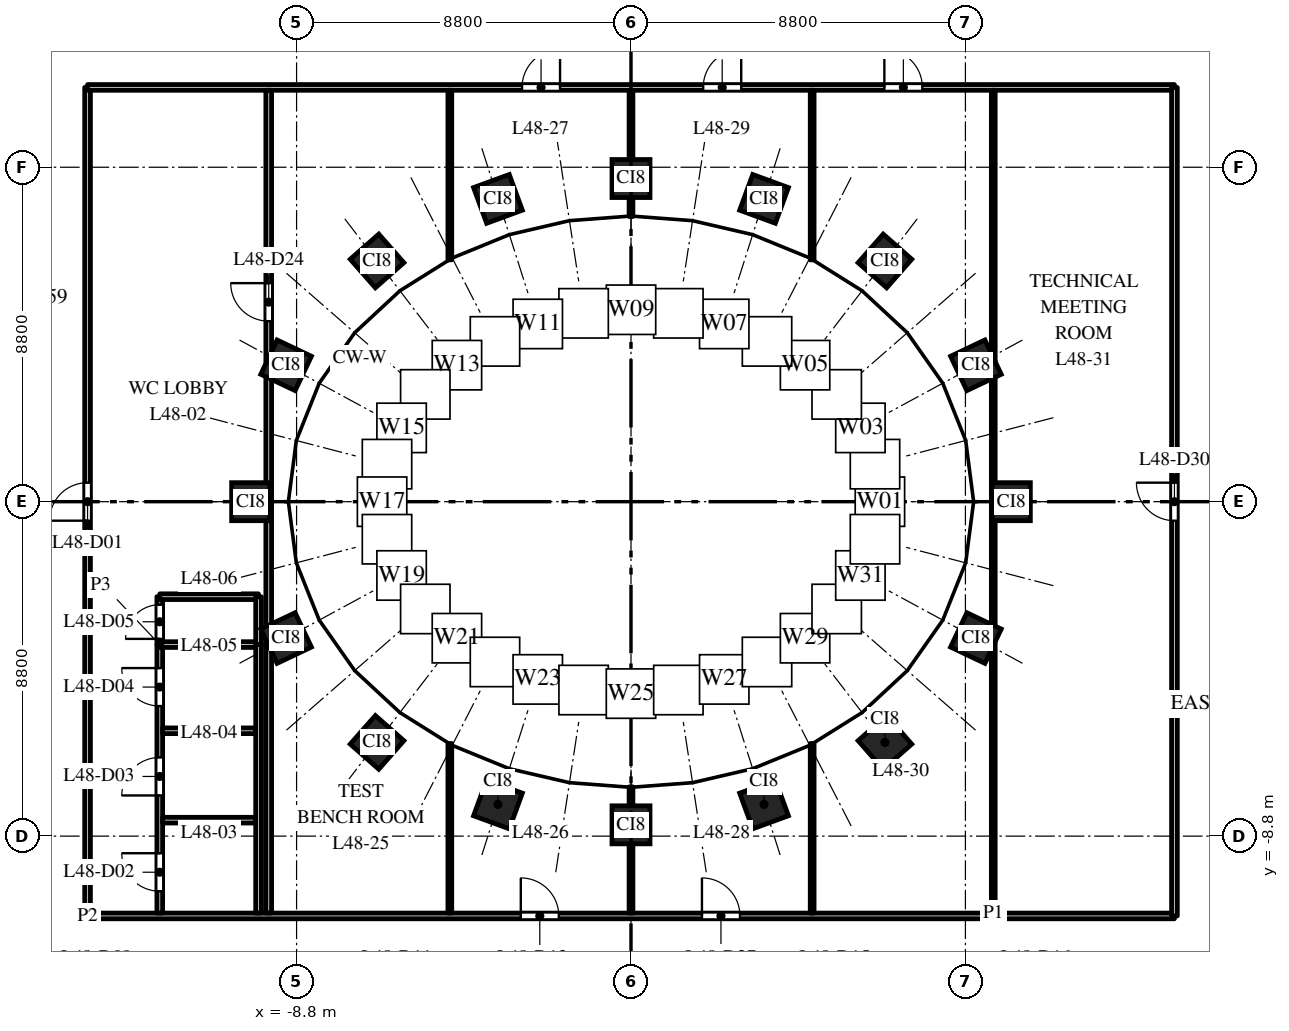
"""IFC4 building model, lengths in metres.
Left out: names, types, materials, properties, quantities, classifications, styles, units other than length and angle.
Written with IfcOpenShell. Run it as: python <this file> out.ifc"""

import sys

from ifc_helpers import new_model, si_unit, direction, frame, frame_2d, origin, origin_2d, place, context, subcontext, project, spatial, rectangle, extrude, element, fill, save


model = new_model("IFC4")
c1 = context("Model", 3, precision=1e-05, world=origin(), true_north=direction((0.0, 1.0)))
c2 = subcontext(c1, "Body", "Model", "MODEL_VIEW")
j1 = project(units=[si_unit("LENGTHUNIT", "METRE"), si_unit("PLANEANGLEUNIT", "RADIAN")], contexts=[c1])
p1 = place(None, origin())
s1 = spatial("IfcSite", under=j1, at=p1, CompositionType="ELEMENT")
p2 = place(p1, origin())
s2 = spatial("IfcBuilding", under=s1, at=p2, CompositionType="ELEMENT")
p3 = place(p2, frame((0.0, 0.0, 233.5)))
s3 = spatial("IfcBuildingStorey", under=s2, at=p3, CompositionType="ELEMENT", Elevation=233.5)
for number, where, z_axis, x_axis in (
    (1, (10.008, 0.0, 0.0), (0.0, 0.0, 1.0), (0.0, 1.0, 0.0)),
    (2, (9.076, 3.588, 0.0), (0.0, 0.0, 1.0), (-0.429, 0.903, 0.0)),
    (3, (6.682, 6.334, 0.0), (0.0, 0.0, 1.0), (-0.751, 0.66, 0.0)),
    (4, (3.501, 7.967, 0.0), (0.0, 0.0, 1.0), (-0.939, 0.344, 0.0)),
    (5, (0.0, 8.503, 0.0), (0.0, 0.0, 1.0), (-1.0, 0.0, 0.0)),
    (6, (-3.501, 7.967, 0.0), (0.0, 0.0, 1.0), (-0.939, -0.344, 0.0)),
    (7, (-6.682, 6.334, 0.0), (0.0, 0.0, 1.0), (-0.751, -0.66, 0.0)),
    (8, (-9.076, 3.588, 0.0), (0.0, 0.0, 1.0), (-0.429, -0.903, 0.0)),
    (9, (-10.008, 0.0, 0.0), (0.0, 0.0, 1.0), (0.0, -1.0, 0.0)),
    (10, (-9.076, -3.588, 0.0), (0.0, 0.0, 1.0), (0.429, -0.903, 0.0)),
    (11, (-6.682, -6.334, 0.0), (0.0, 0.0, 1.0), (0.751, -0.66, 0.0)),
    (12, (-3.501, -7.967, 0.0), (0.0, 0.0, 1.0), (0.939, -0.344, 0.0)),
    (13, (0.0, -8.503, 0.0), (0.0, 0.0, 1.0), (1.0, 0.0, 0.0)),
    (14, (3.501, -7.967, 0.0), (0.0, 0.0, 1.0), (0.939, 0.344, 0.0)),
    (15, (6.682, -6.334, 0.0), (0.0, 0.0, 1.0), (0.751, 0.66, 0.0)),
    (16, (9.076, -3.588, 0.0), (0.0, 0.0, 1.0), (0.429, 0.903, 0.0)),
):
    element("IfcColumn", number, at=place(p3, frame(where, z_axis=z_axis, x_axis=x_axis)), inside=s3, PredefinedType="COLUMN", context=c2, shape_type="SweptSolid", body=[
        extrude(rectangle(XDim=1.0, YDim=1.0, at=origin_2d()), origin(), (0.0, 0.0, 1.0), 4.0),
    ])
p4 = place(p3, frame((-14.3, -10.9, 0.0), z_axis=(0.0, 0.0, 1.0), x_axis=(0.0, 1.0, 0.0)))
e17 = element("IfcWall", 17, at=p4, inside=s3, PredefinedType="PARTITIONING", context=c2, shape_type="SweptSolid", body=[
    extrude(rectangle(XDim=21.8, YDim=0.15, at=frame_2d((10.9, 0.0))), origin(), (0.0, 0.0, 1.0), 2.75),
])
p5 = place(p4, frame((10.4, 0.0, 0.0)))
e18 = element("IfcOpeningElement", 18, at=p5, cuts=e17, PredefinedType="OPENING", context=c2, shape_type="SweptSolid", body=[
    extrude(rectangle(XDim=1.0, YDim=2.1, at=frame_2d((0.5, 1.05))), frame((0.0, 0.085, 0.0), z_axis=(0.0, -1.0, 0.0), x_axis=(1.0, 0.0, 0.0)), (0.0, 0.0, 1.0), 0.17),
])
p6 = place(p3, frame((-14.3, -10.9, 0.0), z_axis=(0.0, 0.0, 1.0), x_axis=(1.0, 0.0, 0.0)))
e19 = element("IfcWall", 19, at=p6, inside=s3, PredefinedType="PARTITIONING", context=c2, shape_type="SweptSolid", body=[
    extrude(rectangle(XDim=28.6, YDim=0.15, at=frame_2d((14.3, 0.0))), origin(), (0.0, 0.0, 1.0), 2.85),
])
p7 = place(p6, frame((11.4, 0.0, 0.0)))
e20 = element("IfcOpeningElement", 20, at=p7, cuts=e19, PredefinedType="OPENING", context=c2, shape_type="SweptSolid", body=[
    extrude(rectangle(XDim=1.0, YDim=2.1, at=frame_2d((0.5, 1.05))), frame((0.0, 0.085, 0.0), z_axis=(0.0, -1.0, 0.0), x_axis=(1.0, 0.0, 0.0)), (0.0, 0.0, 1.0), 0.17),
])
p8 = place(p6, frame((16.167, 0.0, 0.0)))
e21 = element("IfcOpeningElement", 21, at=p8, cuts=e19, PredefinedType="OPENING", context=c2, shape_type="SweptSolid", body=[
    extrude(rectangle(XDim=1.0, YDim=2.1, at=frame_2d((0.5, 1.05))), frame((0.0, 0.085, 0.0), z_axis=(0.0, -1.0, 0.0), x_axis=(1.0, 0.0, 0.0)), (0.0, 0.0, 1.0), 0.17),
])
p9 = place(p3, frame((-14.3, 10.9, 0.0), z_axis=(0.0, 0.0, 1.0), x_axis=(1.0, 0.0, 0.0)))
e22 = element("IfcWall", 22, at=p9, inside=s3, PredefinedType="PARTITIONING", context=c2, shape_type="SweptSolid", body=[
    extrude(rectangle(XDim=28.6, YDim=0.15, at=frame_2d((14.3, 0.0))), origin(), (0.0, 0.0, 1.0), 2.85),
])
p10 = place(p9, frame((11.433, 0.0, 0.0)))
e23 = element("IfcOpeningElement", 23, at=p10, cuts=e22, PredefinedType="OPENING", context=c2, shape_type="SweptSolid", body=[
    extrude(rectangle(XDim=1.0, YDim=2.1, at=frame_2d((0.5, 1.05))), frame((0.0, 0.085, 0.0), z_axis=(0.0, -1.0, 0.0), x_axis=(1.0, 0.0, 0.0)), (0.0, 0.0, 1.0), 0.17),
])
p11 = place(p9, frame((16.2, 0.0, 0.0)))
e24 = element("IfcOpeningElement", 24, at=p11, cuts=e22, PredefinedType="OPENING", context=c2, shape_type="SweptSolid", body=[
    extrude(rectangle(XDim=1.0, YDim=2.1, at=frame_2d((0.5, 1.05))), frame((0.0, 0.085, 0.0), z_axis=(0.0, -1.0, 0.0), x_axis=(1.0, 0.0, 0.0)), (0.0, 0.0, 1.0), 0.17),
])
p12 = place(p9, frame((20.967, 0.0, 0.0)))
e25 = element("IfcOpeningElement", 25, at=p12, cuts=e22, PredefinedType="OPENING", context=c2, shape_type="SweptSolid", body=[
    extrude(rectangle(XDim=1.0, YDim=2.1, at=frame_2d((0.5, 1.05))), frame((0.0, 0.085, 0.0), z_axis=(0.0, -1.0, 0.0), x_axis=(1.0, 0.0, 0.0)), (0.0, 0.0, 1.0), 0.17),
])
p13 = place(p3, frame((-12.4, -10.825, 0.0), z_axis=(0.0, 0.0, 1.0), x_axis=(0.0, 1.0, 0.0)))
e26 = element("IfcWall", 26, at=p13, inside=s3, PredefinedType="PARTITIONING", context=c2, shape_type="SweptSolid", body=[
    extrude(rectangle(XDim=7.065, YDim=0.15, at=frame_2d((3.532, 0.0))), origin(), (0.0, 0.0, 1.0), 2.75),
])
p14 = place(p13, frame((0.575, 0.0, 0.0)))
e27 = element("IfcOpeningElement", 27, at=p14, cuts=e26, PredefinedType="OPENING", context=c2, shape_type="SweptSolid", body=[
    extrude(rectangle(XDim=1.0, YDim=2.1, at=frame_2d((0.5, 1.05))), frame((0.0, 0.085, 0.0), z_axis=(0.0, -1.0, 0.0), x_axis=(1.0, 0.0, 0.0)), (0.0, 0.0, 1.0), 0.17),
])
p15 = place(p13, frame((3.095, 0.0, 0.0)))
e28 = element("IfcOpeningElement", 28, at=p15, cuts=e26, PredefinedType="OPENING", context=c2, shape_type="SweptSolid", body=[
    extrude(rectangle(XDim=1.0, YDim=2.1, at=frame_2d((0.5, 1.05))), frame((0.0, 0.085, 0.0), z_axis=(0.0, -1.0, 0.0), x_axis=(1.0, 0.0, 0.0)), (0.0, 0.0, 1.0), 0.17),
])
p16 = place(p13, frame((5.447, 0.0, 0.0)))
e29 = element("IfcOpeningElement", 29, at=p16, cuts=e26, PredefinedType="OPENING", context=c2, shape_type="SweptSolid", body=[
    extrude(rectangle(XDim=1.0, YDim=2.1, at=frame_2d((0.5, 1.05))), frame((0.0, 0.085, 0.0), z_axis=(0.0, -1.0, 0.0), x_axis=(1.0, 0.0, 0.0)), (0.0, 0.0, 1.0), 0.17),
])
p17 = place(p3, frame((-12.325, -8.38, 0.0), z_axis=(0.0, 0.0, 1.0), x_axis=(1.0, 0.0, 0.0)))
e30 = element("IfcWall", 30, at=p17, inside=s3, PredefinedType="PARTITIONING", context=c2, shape_type="SweptSolid", body=[
    extrude(rectangle(XDim=2.45, YDim=0.15, at=frame_2d((1.225, 0.0))), origin(), (0.0, 0.0, 1.0), 2.75),
])
p18 = place(p3, frame((-12.325, -6.028, 0.0), z_axis=(0.0, 0.0, 1.0), x_axis=(1.0, 0.0, 0.0)))
e31 = element("IfcWall", 31, at=p18, inside=s3, PredefinedType="PARTITIONING", context=c2, shape_type="SweptSolid", body=[
    extrude(rectangle(XDim=2.45, YDim=0.15, at=frame_2d((1.225, 0.0))), origin(), (0.0, 0.0, 1.0), 3.7),
])
p19 = place(p3, frame((-12.4, -3.76, 0.0), z_axis=(0.0, 0.0, 1.0), x_axis=(0.0, 1.0, 0.0)))
e32 = element("IfcWall", 32, at=p19, inside=s3, PredefinedType="PARTITIONING", context=c2, shape_type="SweptSolid", body=[
    extrude(rectangle(XDim=1.26, YDim=0.15, at=frame_2d((0.63, 0.0))), origin(), (0.0, 0.0, 1.0), 3.7),
])
p20 = place(p19, frame((0.15, 0.0, 0.0)))
e33 = element("IfcOpeningElement", 33, at=p20, cuts=e32, PredefinedType="OPENING", context=c2, shape_type="SweptSolid", body=[
    extrude(rectangle(XDim=0.9, YDim=2.1, at=frame_2d((0.45, 1.05))), frame((0.0, 0.085, 0.0), z_axis=(0.0, -1.0, 0.0), x_axis=(1.0, 0.0, 0.0)), (0.0, 0.0, 1.0), 0.17),
])
p21 = place(p3, frame((-12.4, -3.76, 0.0), z_axis=(0.0, 0.0, 1.0), x_axis=(1.0, 0.0, 0.0)))
e34 = element("IfcWall", 34, at=p21, inside=s3, PredefinedType="PARTITIONING", context=c2, shape_type="SweptSolid", body=[
    extrude(rectangle(XDim=2.6, YDim=0.15, at=frame_2d((1.3, 0.0))), origin(), (0.0, 0.0, 1.0), 3.7),
])
p22 = place(p3, frame((-12.4, -2.5, 0.0), z_axis=(0.0, 0.0, 1.0), x_axis=(1.0, 0.0, 0.0)))
e35 = element("IfcWall", 35, at=p22, inside=s3, PredefinedType="PARTITIONING", context=c2, shape_type="SweptSolid", body=[
    extrude(rectangle(XDim=2.596, YDim=0.15, at=frame_2d((1.298, 0.0))), origin(), (0.0, 0.0, 1.0), 3.7),
])
p23 = place(p3, frame((-9.8, -10.825, 0.0), z_axis=(0.0, 0.0, 1.0), x_axis=(0.0, 1.0, 0.0)))
e36 = element("IfcWall", 36, at=p23, inside=s3, PredefinedType="PARTITIONING", context=c2, shape_type="SweptSolid", body=[
    extrude(rectangle(XDim=7.065, YDim=0.15, at=frame_2d((3.532, 0.0))), origin(), (0.0, 0.0, 1.0), 2.75),
])
p24 = place(p3, frame((-9.8, -3.76, 0.0), z_axis=(0.0, 0.0, 1.0), x_axis=(0.0, 1.0, 0.0)))
e37 = element("IfcWall", 37, at=p24, inside=s3, PredefinedType="PARTITIONING", context=c2, shape_type="SweptSolid", body=[
    extrude(rectangle(XDim=1.256, YDim=0.15, at=frame_2d((0.628, 0.0))), origin(), (0.0, 0.0, 1.0), 3.7),
])
p25 = place(p3, frame((-9.533, -10.825, 0.0), z_axis=(0.0, 0.0, 1.0), x_axis=(0.0, 1.0, 0.0)))
e38 = element("IfcWall", 38, at=p25, inside=s3, PredefinedType="PARTITIONING", context=c2, shape_type="SweptSolid", body=[
    extrude(rectangle(XDim=21.65, YDim=0.15, at=frame_2d((10.825, 0.0))), origin(), (0.0, 0.0, 1.0), 2.75),
])
p26 = place(p25, frame((15.575, 0.0, 0.0)))
e39 = element("IfcOpeningElement", 39, at=p26, cuts=e38, PredefinedType="OPENING", context=c2, shape_type="SweptSolid", body=[
    extrude(rectangle(XDim=1.0, YDim=2.1, at=frame_2d((0.5, 1.05))), frame((0.0, 0.085, 0.0), z_axis=(0.0, -1.0, 0.0), x_axis=(1.0, 0.0, 0.0)), (0.0, 0.0, 1.0), 0.17),
])
for number, where, z_axis, x_axis in (
    (40, (-4.767, -10.825, 0.0), (0.0, 0.0, 1.0), (0.0, 1.0, 0.0)),
    (41, (-4.767, 6.363, 0.0), (0.0, 0.0, 1.0), (0.0, 1.0, 0.0)),
):
    element("IfcWall", number, at=place(p3, frame(where, z_axis=z_axis, x_axis=x_axis)), inside=s3, PredefinedType="PARTITIONING", context=c2, shape_type="SweptSolid", body=[
        extrude(rectangle(XDim=4.462, YDim=0.1, at=frame_2d((2.231, 0.0))), origin(), (0.0, 0.0, 1.0), 3.0),
    ])
for number, where, z_axis, x_axis in (
    (42, (0.0, -10.825, 0.0), (0.0, 0.0, 1.0), (0.0, 1.0, 0.0)),
    (43, (0.0, 7.504, 0.0), (0.0, 0.0, 1.0), (0.0, 1.0, 0.0)),
):
    element("IfcWall", number, at=place(p3, frame(where, z_axis=z_axis, x_axis=x_axis)), inside=s3, PredefinedType="PARTITIONING", context=c2, shape_type="SweptSolid", body=[
        extrude(rectangle(XDim=3.321, YDim=0.1, at=frame_2d((1.661, 0.0))), origin(), (0.0, 0.0, 1.0), 3.7),
    ])
for number, where, z_axis, x_axis in (
    (44, (4.767, -10.825, 0.0), (0.0, 0.0, 1.0), (0.0, 1.0, 0.0)),
    (45, (4.767, 6.363, 0.0), (0.0, 0.0, 1.0), (0.0, 1.0, 0.0)),
):
    element("IfcWall", number, at=place(p3, frame(where, z_axis=z_axis, x_axis=x_axis)), inside=s3, PredefinedType="PARTITIONING", context=c2, shape_type="SweptSolid", body=[
        extrude(rectangle(XDim=4.462, YDim=0.1, at=frame_2d((2.231, 0.0))), origin(), (0.0, 0.0, 1.0), 2.85),
    ])
p27 = place(p3, frame((9.533, -10.825, 0.0), z_axis=(0.0, 0.0, 1.0), x_axis=(0.0, 1.0, 0.0)))
e46 = element("IfcWall", 46, at=p27, inside=s3, PredefinedType="PARTITIONING", context=c2, shape_type="SweptSolid", body=[
    extrude(rectangle(XDim=21.65, YDim=0.1, at=frame_2d((10.825, 0.0))), origin(), (0.0, 0.0, 1.0), 2.75),
])
p28 = place(p3, frame((14.3, -10.9, 0.0), z_axis=(0.0, 0.0, 1.0), x_axis=(0.0, 1.0, 0.0)))
e47 = element("IfcWall", 47, at=p28, inside=s3, PredefinedType="PARTITIONING", context=c2, shape_type="SweptSolid", body=[
    extrude(rectangle(XDim=21.8, YDim=0.15, at=frame_2d((10.9, 0.0))), origin(), (0.0, 0.0, 1.0), 2.75),
])
p29 = place(p28, frame((10.4, 0.0, 0.0)))
e48 = element("IfcOpeningElement", 48, at=p29, cuts=e47, PredefinedType="OPENING", context=c2, shape_type="SweptSolid", body=[
    extrude(rectangle(XDim=1.0, YDim=2.1, at=frame_2d((0.5, 1.05))), frame((0.0, 0.085, 0.0), z_axis=(0.0, -1.0, 0.0), x_axis=(1.0, 0.0, 0.0)), (0.0, 0.0, 1.0), 0.17),
])
p30 = place(p5, origin())
e49 = element("IfcDoor", 49, at=p30, inside=s3, OperationType="SINGLE_SWING_LEFT", PredefinedType="DOOR", context=c2, shape_type="SweptSolid", body=[
    extrude(rectangle(XDim=1.0, YDim=2.1, at=frame_2d((0.5, 1.05))), frame((0.0, 0.025, 0.0), z_axis=(0.0, -1.0, 0.0), x_axis=(1.0, 0.0, 0.0)), (0.0, 0.0, 1.0), 0.05),
])
fill(e18, e49)
p31 = place(p14, origin())
e50 = element("IfcDoor", 50, at=p31, inside=s3, OperationType="SINGLE_SWING_RIGHT", PredefinedType="DOOR", context=c2, shape_type="SweptSolid", body=[
    extrude(rectangle(XDim=1.0, YDim=2.1, at=frame_2d((0.5, 1.05))), frame((0.0, 0.025, 0.0), z_axis=(0.0, -1.0, 0.0), x_axis=(1.0, 0.0, 0.0)), (0.0, 0.0, 1.0), 0.05),
])
fill(e27, e50)
p32 = place(p15, origin())
e51 = element("IfcDoor", 51, at=p32, inside=s3, OperationType="SINGLE_SWING_LEFT", PredefinedType="DOOR", context=c2, shape_type="SweptSolid", body=[
    extrude(rectangle(XDim=1.0, YDim=2.1, at=frame_2d((0.5, 1.05))), frame((0.0, 0.025, 0.0), z_axis=(0.0, -1.0, 0.0), x_axis=(1.0, 0.0, 0.0)), (0.0, 0.0, 1.0), 0.05),
])
fill(e28, e51)
p33 = place(p16, origin())
e52 = element("IfcDoor", 52, at=p33, inside=s3, OperationType="SINGLE_SWING_RIGHT", PredefinedType="DOOR", context=c2, shape_type="SweptSolid", body=[
    extrude(rectangle(XDim=1.0, YDim=2.1, at=frame_2d((0.5, 1.05))), frame((0.0, 0.025, 0.0), z_axis=(0.0, -1.0, 0.0), x_axis=(1.0, 0.0, 0.0)), (0.0, 0.0, 1.0), 0.05),
])
fill(e29, e52)
p34 = place(p20, origin())
e53 = element("IfcDoor", 53, at=p34, inside=s3, OperationType="SINGLE_SWING_LEFT", PredefinedType="DOOR", context=c2, shape_type="SweptSolid", body=[
    extrude(rectangle(XDim=0.9, YDim=2.1, at=frame_2d((0.45, 1.05))), frame((0.0, 0.025, 0.0), z_axis=(0.0, -1.0, 0.0), x_axis=(1.0, 0.0, 0.0)), (0.0, 0.0, 1.0), 0.05),
])
fill(e33, e53)
p35 = place(p26, origin())
e54 = element("IfcDoor", 54, at=p35, inside=s3, OperationType="SINGLE_SWING_RIGHT", PredefinedType="DOOR", context=c2, shape_type="SweptSolid", body=[
    extrude(rectangle(XDim=1.0, YDim=2.1, at=frame_2d((0.5, 1.05))), frame((0.0, 0.025, 0.0), z_axis=(0.0, -1.0, 0.0), x_axis=(1.0, 0.0, 0.0)), (0.0, 0.0, 1.0), 0.05),
])
fill(e39, e54)
p36 = place(p7, origin())
e55 = element("IfcDoor", 55, at=p36, inside=s3, OperationType="SINGLE_SWING_LEFT", PredefinedType="DOOR", context=c2, shape_type="SweptSolid", body=[
    extrude(rectangle(XDim=1.0, YDim=2.1, at=frame_2d((0.5, 1.05))), frame((0.0, 0.025, 0.0), z_axis=(0.0, -1.0, 0.0), x_axis=(1.0, 0.0, 0.0)), (0.0, 0.0, 1.0), 0.05),
])
fill(e20, e55)
p37 = place(p10, origin())
e56 = element("IfcDoor", 56, at=p37, inside=s3, OperationType="SINGLE_SWING_RIGHT", PredefinedType="DOOR", context=c2, shape_type="SweptSolid", body=[
    extrude(rectangle(XDim=1.0, YDim=2.1, at=frame_2d((0.5, 1.05))), frame((0.0, 0.025, 0.0), z_axis=(0.0, -1.0, 0.0), x_axis=(1.0, 0.0, 0.0)), (0.0, 0.0, 1.0), 0.05),
])
fill(e23, e56)
p38 = place(p8, origin())
e57 = element("IfcDoor", 57, at=p38, inside=s3, OperationType="SINGLE_SWING_LEFT", PredefinedType="DOOR", context=c2, shape_type="SweptSolid", body=[
    extrude(rectangle(XDim=1.0, YDim=2.1, at=frame_2d((0.5, 1.05))), frame((0.0, 0.025, 0.0), z_axis=(0.0, -1.0, 0.0), x_axis=(1.0, 0.0, 0.0)), (0.0, 0.0, 1.0), 0.05),
])
fill(e21, e57)
p39 = place(p11, origin())
e58 = element("IfcDoor", 58, at=p39, inside=s3, OperationType="SINGLE_SWING_RIGHT", PredefinedType="DOOR", context=c2, shape_type="SweptSolid", body=[
    extrude(rectangle(XDim=1.0, YDim=2.1, at=frame_2d((0.5, 1.05))), frame((0.0, 0.025, 0.0), z_axis=(0.0, -1.0, 0.0), x_axis=(1.0, 0.0, 0.0)), (0.0, 0.0, 1.0), 0.05),
])
fill(e24, e58)
p40 = place(p12, origin())
e59 = element("IfcDoor", 59, at=p40, inside=s3, OperationType="SINGLE_SWING_LEFT", PredefinedType="DOOR", context=c2, shape_type="SweptSolid", body=[
    extrude(rectangle(XDim=1.0, YDim=2.1, at=frame_2d((0.5, 1.05))), frame((0.0, 0.025, 0.0), z_axis=(0.0, -1.0, 0.0), x_axis=(1.0, 0.0, 0.0)), (0.0, 0.0, 1.0), 0.05),
])
fill(e25, e59)
p41 = place(p29, origin())
e60 = element("IfcDoor", 60, at=p41, inside=s3, OperationType="SINGLE_SWING_RIGHT", PredefinedType="DOOR", context=c2, shape_type="SweptSolid", body=[
    extrude(rectangle(XDim=1.0, YDim=2.1, at=frame_2d((0.5, 1.05))), frame((0.0, 0.025, 0.0), z_axis=(0.0, -1.0, 0.0), x_axis=(1.0, 0.0, 0.0)), (0.0, 0.0, 1.0), 0.05),
])
fill(e48, e60)
save(model, sys.argv[1])
